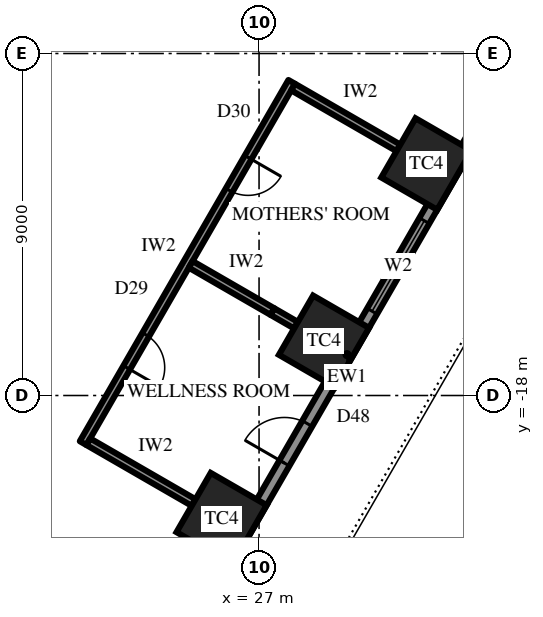
"""IFC4 building model, lengths in metres.
Left out: names, types, materials, properties, quantities, classifications, styles, units other than length and angle.
Written with IfcOpenShell. Run it as: python <this file> out.ifc"""

import sys

from ifc_helpers import new_model, si_unit, direction, frame, frame_2d, origin, origin_2d, place, context, subcontext, project, spatial, rectangle, extrude, element, fill, save


model = new_model("IFC4")
c1 = context("Model", 3, precision=1e-05, world=origin(), true_north=direction((0.0, 1.0)))
c2 = subcontext(c1, "Body", "Model", "MODEL_VIEW")
j1 = project(units=[si_unit("LENGTHUNIT", "METRE"), si_unit("PLANEANGLEUNIT", "RADIAN")], contexts=[c1])
p1 = place(None, origin())
s1 = spatial("IfcSite", under=j1, at=p1, CompositionType="ELEMENT")
p2 = place(p1, origin())
s2 = spatial("IfcBuilding", under=s1, at=p2, CompositionType="ELEMENT")
p3 = place(p2, frame((0.0, 0.0, 86.5)))
s3 = spatial("IfcBuildingStorey", under=s2, at=p3, CompositionType="ELEMENT", Elevation=86.5)
for number, where, z_axis, x_axis in (
    (1, (26.014, -21.242, 0.0), (0.0, 0.0, 1.0), (0.5, 0.866, 0.0)),
    (2, (28.709, -16.575, 0.0), (0.0, 0.0, 1.0), (0.5, 0.866, 0.0)),
    (3, (31.403, -11.908, 0.0), (0.0, 0.0, 1.0), (0.5, 0.866, 0.0)),
):
    element("IfcColumn", number, at=place(p3, frame(where, z_axis=z_axis, x_axis=x_axis)), inside=s3, PredefinedType="COLUMN", context=c2, shape_type="SweptSolid", body=[
        extrude(rectangle(XDim=1.8, YDim=1.7, at=origin_2d()), origin(), (0.0, 0.0, 1.0), 4.2),
    ])
p4 = place(p3, frame((21.232, -30.925, 0.0), z_axis=(0.0, 0.0, 1.0), x_axis=(0.499999163675, 0.866025886636, 0.0)))
e4 = element("IfcWall", 4, at=p4, inside=s3, PredefinedType="SOLIDWALL", context=c2, shape_type="SweptSolid", body=[
    extrude(rectangle(XDim=32.332, YDim=0.3, at=frame_2d((16.166, 0.0))), origin(), (0.0, 0.0, 1.0), 2.7),
])
p5 = place(p4, frame((1.319, 0.0, 0.6)))
e5 = element("IfcOpeningElement", 5, at=p5, cuts=e4, PredefinedType="OPENING", context=c2, shape_type="SweptSolid", body=[
    extrude(rectangle(XDim=2.75, YDim=1.85, at=frame_2d((1.375, 0.925))), frame((0.0, 0.16, 0.0), z_axis=(0.0, -1.0, 0.0), x_axis=(1.0, 0.0, 0.0)), (0.0, 0.0, 1.0), 0.32),
])
p6 = place(p4, frame((6.708, 0.0, 0.6)))
e6 = element("IfcOpeningElement", 6, at=p6, cuts=e4, PredefinedType="OPENING", context=c2, shape_type="SweptSolid", body=[
    extrude(rectangle(XDim=2.75, YDim=1.85, at=frame_2d((1.375, 0.925))), frame((0.0, 0.16, 0.0), z_axis=(0.0, -1.0, 0.0), x_axis=(1.0, 0.0, 0.0)), (0.0, 0.0, 1.0), 0.32),
])
p7 = place(p4, frame((12.872, 0.0, 0.0)))
e7 = element("IfcOpeningElement", 7, at=p7, cuts=e4, PredefinedType="OPENING", context=c2, shape_type="SweptSolid", body=[
    extrude(rectangle(XDim=1.2, YDim=2.4, at=frame_2d((0.6, 1.2))), frame((0.0, 0.16, 0.0), z_axis=(0.0, -1.0, 0.0), x_axis=(1.0, 0.0, 0.0)), (0.0, 0.0, 1.0), 0.32),
])
p8 = place(p4, frame((17.485, 0.0, 0.6)))
e8 = element("IfcOpeningElement", 8, at=p8, cuts=e4, PredefinedType="OPENING", context=c2, shape_type="SweptSolid", body=[
    extrude(rectangle(XDim=2.75, YDim=1.85, at=frame_2d((1.375, 0.925))), frame((0.0, 0.16, 0.0), z_axis=(0.0, -1.0, 0.0), x_axis=(1.0, 0.0, 0.0)), (0.0, 0.0, 1.0), 0.32),
])
p9 = place(p4, frame((22.874, 0.0, 0.6)))
e9 = element("IfcOpeningElement", 9, at=p9, cuts=e4, PredefinedType="OPENING", context=c2, shape_type="SweptSolid", body=[
    extrude(rectangle(XDim=2.75, YDim=1.85, at=frame_2d((1.375, 0.925))), frame((0.0, 0.16, 0.0), z_axis=(0.0, -1.0, 0.0), x_axis=(1.0, 0.0, 0.0)), (0.0, 0.0, 1.0), 0.32),
])
p10 = place(p4, frame((28.262, 0.0, 0.6)))
e10 = element("IfcOpeningElement", 10, at=p10, cuts=e4, PredefinedType="OPENING", context=c2, shape_type="SweptSolid", body=[
    extrude(rectangle(XDim=2.75, YDim=1.85, at=frame_2d((1.375, 0.925))), frame((0.0, 0.16, 0.0), z_axis=(0.0, -1.0, 0.0), x_axis=(1.0, 0.0, 0.0)), (0.0, 0.0, 1.0), 0.32),
])
p11 = place(p3, frame((22.37, -19.253, 0.0), z_axis=(0.0, 0.0, 1.0), x_axis=(0.500018936051, 0.866014470774, 0.0)))
e11 = element("IfcWall", 11, at=p11, inside=s3, PredefinedType="PARTITIONING", context=c2, shape_type="SweptSolid", body=[
    extrude(rectangle(XDim=10.977, YDim=0.2, at=frame_2d((5.489, 0.0))), origin(), (0.0, 0.0, 1.0), 4.0),
])
p12 = place(p11, frame((2.294, 0.0, 0.0)))
e12 = element("IfcOpeningElement", 12, at=p12, cuts=e11, PredefinedType="OPENING", context=c2, shape_type="SweptSolid", body=[
    extrude(rectangle(XDim=1.0, YDim=2.2, at=frame_2d((0.5, 1.1))), frame((0.0, 0.11, 0.0), z_axis=(0.0, -1.0, 0.0), x_axis=(1.0, 0.0, 0.0)), (0.0, 0.0, 1.0), 0.22),
])
p13 = place(p11, frame((7.683, 0.0, 0.0)))
e13 = element("IfcOpeningElement", 13, at=p13, cuts=e11, PredefinedType="OPENING", context=c2, shape_type="SweptSolid", body=[
    extrude(rectangle(XDim=1.0, YDim=2.2, at=frame_2d((0.5, 1.1))), frame((0.0, 0.11, 0.0), z_axis=(0.0, -1.0, 0.0), x_axis=(1.0, 0.0, 0.0)), (0.0, 0.0, 1.0), 0.22),
])
p14 = place(p3, frame((22.507, -19.217, 0.0), z_axis=(0.0, 0.0, 1.0), x_axis=(0.866008981251, -0.500028443584, 0.0)))
e14 = element("IfcWall", 14, at=p14, inside=s3, PredefinedType="PARTITIONING", context=c2, shape_type="SweptSolid", body=[
    extrude(rectangle(XDim=3.2, YDim=0.2, at=frame_2d((1.6, 0.0))), origin(), (0.0, 0.0, 1.0), 2.992),
])
p15 = place(p3, frame((25.201, -14.55, 0.0), z_axis=(0.0, 0.0, 1.0), x_axis=(0.866020232408, -0.500008956979, 0.0)))
e15 = element("IfcWall", 15, at=p15, inside=s3, PredefinedType="PARTITIONING", context=c2, shape_type="SweptSolid", body=[
    extrude(rectangle(XDim=2.483, YDim=0.2, at=frame_2d((1.242, 0.0))), origin(), (0.0, 0.0, 1.0), 4.0),
])
p16 = place(p3, frame((27.352, -15.792, 0.0), z_axis=(0.0, 0.0, 1.0), x_axis=(0.866117509073, -0.499840435016, 0.0)))
e16 = element("IfcWall", 16, at=p16, inside=s3, PredefinedType="PARTITIONING", context=c2, shape_type="SweptSolid", body=[
    extrude(rectangle(XDim=0.717, YDim=0.2, at=frame_2d((0.358, 0.0))), origin(), (0.0, 0.0, 1.0), 2.992),
])
p17 = place(p3, frame((27.896, -9.883, 0.0), z_axis=(0.0, 0.0, 1.0), x_axis=(0.866008981251, -0.500028443584, 0.0)))
e17 = element("IfcWall", 17, at=p17, inside=s3, PredefinedType="PARTITIONING", context=c2, shape_type="SweptSolid", body=[
    extrude(rectangle(XDim=3.2, YDim=0.2, at=frame_2d((1.6, 0.0))), origin(), (0.0, 0.0, 1.0), 2.944),
])
p18 = place(p7, origin())
e18 = element("IfcDoor", 18, at=p18, inside=s3, OperationType="SINGLE_SWING_RIGHT", PredefinedType="DOOR", context=c2, shape_type="SweptSolid", body=[
    extrude(rectangle(XDim=1.2, YDim=2.4, at=frame_2d((0.6, 1.2))), frame((0.0, 0.025, 0.0), z_axis=(0.0, -1.0, 0.0), x_axis=(1.0, 0.0, 0.0)), (0.0, 0.0, 1.0), 0.05),
])
fill(e7, e18)
p19 = place(p8, origin())
e19 = element("IfcWindow", 19, at=p19, inside=s3, PartitioningType="SINGLE_PANEL", PredefinedType="WINDOW", context=c2, shape_type="SweptSolid", body=[
    extrude(rectangle(XDim=2.75, YDim=1.85, at=frame_2d((1.375, 0.925))), frame((0.0, 0.03, 0.0), z_axis=(0.0, -1.0, 0.0), x_axis=(1.0, 0.0, 0.0)), (0.0, 0.0, 1.0), 0.06),
])
fill(e8, e19)
p20 = place(p12, frame((1.0, 0.0, 0.0), z_axis=(0.0, 0.0, 1.0), x_axis=(-1.0, 0.0, 0.0)))
e20 = element("IfcDoor", 20, at=p20, inside=s3, OperationType="SINGLE_SWING_LEFT", PredefinedType="DOOR", context=c2, shape_type="SweptSolid", body=[
    extrude(rectangle(XDim=1.0, YDim=2.2, at=frame_2d((0.5, 1.1))), frame((0.0, 0.025, 0.0), z_axis=(0.0, -1.0, 0.0), x_axis=(1.0, 0.0, 0.0)), (0.0, 0.0, 1.0), 0.05),
])
fill(e12, e20)
p21 = place(p13, frame((1.0, 0.0, 0.0), z_axis=(0.0, 0.0, 1.0), x_axis=(-1.0, 0.0, 0.0)))
e21 = element("IfcDoor", 21, at=p21, inside=s3, OperationType="SINGLE_SWING_RIGHT", PredefinedType="DOOR", context=c2, shape_type="SweptSolid", body=[
    extrude(rectangle(XDim=1.0, YDim=2.2, at=frame_2d((0.5, 1.1))), frame((0.0, 0.025, 0.0), z_axis=(0.0, -1.0, 0.0), x_axis=(1.0, 0.0, 0.0)), (0.0, 0.0, 1.0), 0.05),
])
fill(e13, e21)
save(model, sys.argv[1])
